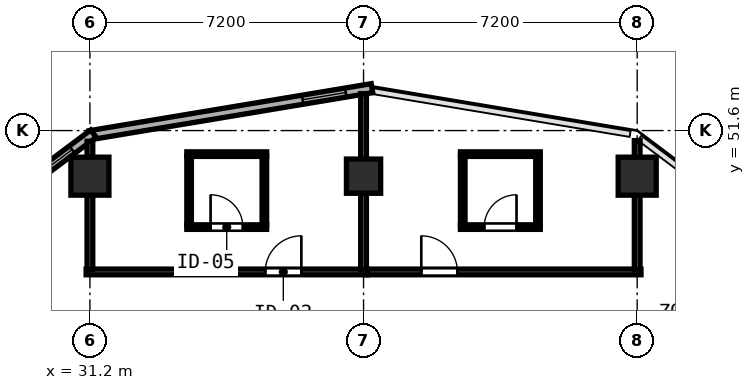
"""IFC4 building model, lengths in metres.
Left out: names, types, materials, properties, quantities, classifications, styles, units other than length and angle.
Written with IfcOpenShell. Run it as: python <this file> out.ifc"""

import sys

from ifc_helpers import new_model, si_unit, direction, frame, frame_2d, origin, origin_2d, place, context, subcontext, project, spatial, rectangle, hollow_rectangle, extrude, element, fill, save


model = new_model("IFC4")
c1 = context("Model", 3, precision=1e-05, world=origin(), true_north=direction((0.0, 1.0)))
c2 = subcontext(c1, "Body", "Model", "MODEL_VIEW")
j1 = project(units=[si_unit("LENGTHUNIT", "METRE"), si_unit("PLANEANGLEUNIT", "RADIAN")], contexts=[c1])
p1 = place(None, origin())
s1 = spatial("IfcSite", under=j1, at=p1, CompositionType="ELEMENT")
p2 = place(p1, origin())
s2 = spatial("IfcBuilding", under=s1, at=p2, CompositionType="ELEMENT")
p3 = place(p2, frame((0.0, 0.0, 121.2)))
s3 = spatial("IfcBuildingStorey", under=s2, at=p3, CompositionType="ELEMENT", Elevation=121.2)
for number, where, z_axis, x_axis in (
    (1, (31.2, 50.4, 0.0), (0.0, 0.0, 1.0), (1.0, 0.0, 0.0)),
    (2, (45.6, 50.4, 0.0), (0.0, 0.0, 1.0), (1.0, 0.0, 0.0)),
):
    element("IfcColumn", number, at=place(p3, frame(where, z_axis=z_axis, x_axis=x_axis)), inside=s3, PredefinedType="COLUMN", context=c2, shape_type="SweptSolid", body=[
        extrude(hollow_rectangle(XDim=1.0, YDim=1.0, WallThickness=0.038, at=origin_2d()), origin(), (0.0, 0.0, 1.0), 3.8),
    ])
p4 = place(p3, frame((38.4, 50.4, 0.0), z_axis=(0.0, 0.0, 1.0), x_axis=(1.0, 0.0, 0.0)))
e3 = element("IfcColumn", 3, at=p4, inside=s3, PredefinedType="COLUMN", context=c2, shape_type="SweptSolid", body=[
    extrude(hollow_rectangle(XDim=0.9, YDim=0.9, WallThickness=0.034, at=origin_2d()), origin(), (0.0, 0.0, 1.0), 3.8),
])
p5 = place(p3, frame((38.622, 52.715, 0.0), z_axis=(0.0, 0.0, 1.0), x_axis=(-0.98639129485, -0.164414760418, 0.0)))
e4 = element("IfcWall", 4, at=p5, inside=s3, PredefinedType="SOLIDWALL", context=c2, shape_type="SweptSolid", body=[
    extrude(rectangle(XDim=7.53, YDim=0.24, at=frame_2d((3.765, 0.0))), origin(), (0.0, 0.0, 1.0), 3.6),
])
p6 = place(p5, frame((0.7, 0.0, 0.85)))
e5 = element("IfcOpeningElement", 5, at=p6, cuts=e4, PredefinedType="OPENING", context=c2, shape_type="SweptSolid", body=[
    extrude(rectangle(XDim=1.15, YDim=1.8, at=frame_2d((0.575, 0.9))), frame((0.0, 0.13, 0.0), z_axis=(0.0, -1.0, 0.0), x_axis=(1.0, 0.0, 0.0)), (0.0, 0.0, 1.0), 0.26),
])
p7 = place(p3, frame((31.292, 51.519, 0.0), z_axis=(0.0, 0.0, 1.0), x_axis=(-0.8, -0.6, 0.0)))
e6 = element("IfcWall", 6, at=p7, inside=s3, PredefinedType="SOLIDWALL", context=c2, shape_type="SweptSolid", body=[
    extrude(rectangle(XDim=6.021, YDim=0.24, at=frame_2d((3.01, 0.0))), origin(), (0.0, 0.0, 1.0), 3.6),
])
p8 = place(p7, frame((0.7, 0.0, 0.85)))
e7 = element("IfcOpeningElement", 7, at=p8, cuts=e6, PredefinedType="OPENING", context=c2, shape_type="SweptSolid", body=[
    extrude(rectangle(XDim=1.15, YDim=1.8, at=frame_2d((0.575, 0.9))), frame((0.0, 0.13, 0.0), z_axis=(0.0, -1.0, 0.0), x_axis=(1.0, 0.0, 0.0)), (0.0, 0.0, 1.0), 0.26),
])
p9 = place(p3, frame((31.1, 47.88, 0.0), z_axis=(0.0, 0.0, 1.0), x_axis=(1.0, 0.0, 0.0)))
e8 = element("IfcWall", 8, at=p9, inside=s3, PredefinedType="PARTITIONING", context=c2, shape_type="SweptSolid", body=[
    extrude(rectangle(XDim=7.4, YDim=0.15, at=frame_2d((3.7, 0.0))), origin(), (0.0, 0.0, 1.0), 3.6),
])
p10 = place(p9, frame((4.714, 0.0, 0.0)))
e9 = element("IfcOpeningElement", 9, at=p10, cuts=e8, PredefinedType="OPENING", context=c2, shape_type="SweptSolid", body=[
    extrude(rectangle(XDim=0.95, YDim=2.15, at=frame_2d((0.475, 1.075))), frame((0.0, 0.085, 0.0), z_axis=(0.0, -1.0, 0.0), x_axis=(1.0, 0.0, 0.0)), (0.0, 0.0, 1.0), 0.17),
])
p11 = place(p3, frame((31.2, 47.94, 0.0), z_axis=(0.0, 0.0, 1.0), x_axis=(0.0, 1.0, 0.0)))
e10 = element("IfcWall", 10, at=p11, inside=s3, PredefinedType="PARTITIONING", context=c2, shape_type="SweptSolid", body=[
    extrude(rectangle(XDim=3.379, YDim=0.15, at=frame_2d((1.689, 0.0))), origin(), (0.0, 0.0, 1.0), 3.085),
])
p12 = place(p3, frame((38.4, 47.94, 0.0), z_axis=(0.0, 0.0, 1.0), x_axis=(0.0, 1.0, 0.0)))
e11 = element("IfcWall", 11, at=p12, inside=s3, PredefinedType="PARTITIONING", context=c2, shape_type="SweptSolid", body=[
    extrude(rectangle(XDim=4.632, YDim=0.15, at=frame_2d((2.316, 0.0))), origin(), (0.0, 0.0, 1.0), 3.6),
])
p13 = place(p3, frame((33.75, 50.98, 0.0), z_axis=(0.0, 0.0, 1.0), x_axis=(1.0, 0.0, 0.0)))
e12 = element("IfcWall", 12, at=p13, inside=s3, PredefinedType="PARTITIONING", context=c2, shape_type="SweptSolid", body=[
    extrude(rectangle(XDim=2.1, YDim=0.12, at=frame_2d((1.05, 0.0))), origin(), (0.0, 0.0, 1.0), 3.6),
])
p14 = place(p3, frame((33.75, 49.06, 0.0), z_axis=(0.0, 0.0, 1.0), x_axis=(1.0, 0.0, 0.0)))
e13 = element("IfcWall", 13, at=p14, inside=s3, PredefinedType="PARTITIONING", context=c2, shape_type="SweptSolid", body=[
    extrude(rectangle(XDim=2.1, YDim=0.12, at=frame_2d((1.05, 0.0))), origin(), (0.0, 0.0, 1.0), 3.6),
])
p15 = place(p14, frame((0.625, 0.0, 0.0)))
e14 = element("IfcOpeningElement", 14, at=p15, cuts=e13, PredefinedType="OPENING", context=c2, shape_type="SweptSolid", body=[
    extrude(rectangle(XDim=0.85, YDim=2.1, at=frame_2d((0.425, 1.05))), frame((0.0, 0.07, 0.0), z_axis=(0.0, -1.0, 0.0), x_axis=(1.0, 0.0, 0.0)), (0.0, 0.0, 1.0), 0.14),
])
for number, where, z_axis, x_axis in (
    (15, (33.81, 49.105, 0.0), (0.0, 0.0, 1.0), (0.0, 1.0, 0.0)),
    (16, (35.79, 49.105, 0.0), (0.0, 0.0, 1.0), (0.0, 1.0, 0.0)),
):
    element("IfcWall", number, at=place(p3, frame(where, z_axis=z_axis, x_axis=x_axis)), inside=s3, PredefinedType="PARTITIONING", context=c2, shape_type="SweptSolid", body=[
        extrude(rectangle(XDim=1.83, YDim=0.12, at=frame_2d((0.915, 0.0))), origin(), (0.0, 0.0, 1.0), 3.6),
    ])
p16 = place(p3, frame((38.502, 47.88, 0.0), z_axis=(0.0, 0.0, 1.0), x_axis=(1.0, 0.0, 0.0)))
e17 = element("IfcWall", 17, at=p16, inside=s3, PredefinedType="PARTITIONING", context=c2, shape_type="SweptSolid", body=[
    extrude(rectangle(XDim=7.198, YDim=0.15, at=frame_2d((3.599, 0.0))), origin(), (0.0, 0.0, 1.0), 3.6),
])
p17 = place(p16, frame((1.417, 0.0, 0.0)))
e18 = element("IfcOpeningElement", 18, at=p17, cuts=e17, PredefinedType="OPENING", context=c2, shape_type="SweptSolid", body=[
    extrude(rectangle(XDim=0.95, YDim=2.15, at=frame_2d((0.475, 1.075))), frame((0.0, 0.085, 0.0), z_axis=(0.0, -1.0, 0.0), x_axis=(1.0, 0.0, 0.0)), (0.0, 0.0, 1.0), 0.17),
])
p18 = place(p3, frame((45.6, 47.94, 0.0), z_axis=(0.0, 0.0, 1.0), x_axis=(0.0, 1.0, 0.0)))
e19 = element("IfcWall", 19, at=p18, inside=s3, PredefinedType="PARTITIONING", context=c2, shape_type="SweptSolid", body=[
    extrude(rectangle(XDim=3.395, YDim=0.15, at=frame_2d((1.698, 0.0))), origin(), (0.0, 0.0, 1.0), 3.085),
])
p19 = place(p3, frame((40.95, 50.98, 0.0), z_axis=(0.0, 0.0, 1.0), x_axis=(1.0, 0.0, 0.0)))
e20 = element("IfcWall", 20, at=p19, inside=s3, PredefinedType="PARTITIONING", context=c2, shape_type="SweptSolid", body=[
    extrude(rectangle(XDim=2.1, YDim=0.12, at=frame_2d((1.05, 0.0))), origin(), (0.0, 0.0, 1.0), 3.6),
])
p20 = place(p3, frame((40.95, 49.06, 0.0), z_axis=(0.0, 0.0, 1.0), x_axis=(1.0, 0.0, 0.0)))
e21 = element("IfcWall", 21, at=p20, inside=s3, PredefinedType="PARTITIONING", context=c2, shape_type="SweptSolid", body=[
    extrude(rectangle(XDim=2.1, YDim=0.12, at=frame_2d((1.05, 0.0))), origin(), (0.0, 0.0, 1.0), 3.6),
])
p21 = place(p20, frame((0.625, 0.0, 0.0)))
e22 = element("IfcOpeningElement", 22, at=p21, cuts=e21, PredefinedType="OPENING", context=c2, shape_type="SweptSolid", body=[
    extrude(rectangle(XDim=0.85, YDim=2.1, at=frame_2d((0.425, 1.05))), frame((0.0, 0.07, 0.0), z_axis=(0.0, -1.0, 0.0), x_axis=(1.0, 0.0, 0.0)), (0.0, 0.0, 1.0), 0.14),
])
for number, where, z_axis, x_axis in (
    (23, (41.01, 49.105, 0.0), (0.0, 0.0, 1.0), (0.0, 1.0, 0.0)),
    (24, (42.99, 49.105, 0.0), (0.0, 0.0, 1.0), (0.0, 1.0, 0.0)),
):
    element("IfcWall", number, at=place(p3, frame(where, z_axis=z_axis, x_axis=x_axis)), inside=s3, PredefinedType="PARTITIONING", context=c2, shape_type="SweptSolid", body=[
        extrude(rectangle(XDim=1.83, YDim=0.12, at=frame_2d((0.915, 0.0))), origin(), (0.0, 0.0, 1.0), 3.6),
    ])
p22 = place(p6, origin())
e25 = element("IfcWindow", 25, at=p22, inside=s3, PartitioningType="SINGLE_PANEL", PredefinedType="WINDOW", context=c2, shape_type="SweptSolid", body=[
    extrude(rectangle(XDim=1.15, YDim=1.8, at=frame_2d((0.575, 0.9))), frame((0.0, 0.03, 0.0), z_axis=(0.0, -1.0, 0.0), x_axis=(1.0, 0.0, 0.0)), (0.0, 0.0, 1.0), 0.06),
])
fill(e5, e25)
p23 = place(p8, origin())
e26 = element("IfcWindow", 26, at=p23, inside=s3, PartitioningType="SINGLE_PANEL", PredefinedType="WINDOW", context=c2, shape_type="SweptSolid", body=[
    extrude(rectangle(XDim=1.15, YDim=1.8, at=frame_2d((0.575, 0.9))), frame((0.0, 0.03, 0.0), z_axis=(0.0, -1.0, 0.0), x_axis=(1.0, 0.0, 0.0)), (0.0, 0.0, 1.0), 0.06),
])
fill(e7, e26)
p24 = place(p10, origin())
e27 = element("IfcDoor", 27, at=p24, inside=s3, OperationType="SINGLE_SWING_RIGHT", PredefinedType="DOOR", context=c2, shape_type="SweptSolid", body=[
    extrude(rectangle(XDim=0.95, YDim=2.15, at=frame_2d((0.475, 1.075))), frame((0.0, 0.025, 0.0), z_axis=(0.0, -1.0, 0.0), x_axis=(1.0, 0.0, 0.0)), (0.0, 0.0, 1.0), 0.05),
])
fill(e9, e27)
p25 = place(p15, origin())
e28 = element("IfcDoor", 28, at=p25, inside=s3, OperationType="SINGLE_SWING_LEFT", PredefinedType="DOOR", context=c2, shape_type="SweptSolid", body=[
    extrude(rectangle(XDim=0.85, YDim=2.1, at=frame_2d((0.425, 1.05))), frame((0.0, 0.025, 0.0), z_axis=(0.0, -1.0, 0.0), x_axis=(1.0, 0.0, 0.0)), (0.0, 0.0, 1.0), 0.05),
])
fill(e14, e28)
p26 = place(p17, origin())
e29 = element("IfcDoor", 29, at=p26, inside=s3, OperationType="SINGLE_SWING_LEFT", PredefinedType="DOOR", context=c2, shape_type="SweptSolid", body=[
    extrude(rectangle(XDim=0.95, YDim=2.15, at=frame_2d((0.475, 1.075))), frame((0.0, 0.025, 0.0), z_axis=(0.0, -1.0, 0.0), x_axis=(1.0, 0.0, 0.0)), (0.0, 0.0, 1.0), 0.05),
])
fill(e18, e29)
p27 = place(p21, origin())
e30 = element("IfcDoor", 30, at=p27, inside=s3, OperationType="SINGLE_SWING_RIGHT", PredefinedType="DOOR", context=c2, shape_type="SweptSolid", body=[
    extrude(rectangle(XDim=0.85, YDim=2.1, at=frame_2d((0.425, 1.05))), frame((0.0, 0.025, 0.0), z_axis=(0.0, -1.0, 0.0), x_axis=(1.0, 0.0, 0.0)), (0.0, 0.0, 1.0), 0.05),
])
fill(e22, e30)
save(model, sys.argv[1])
